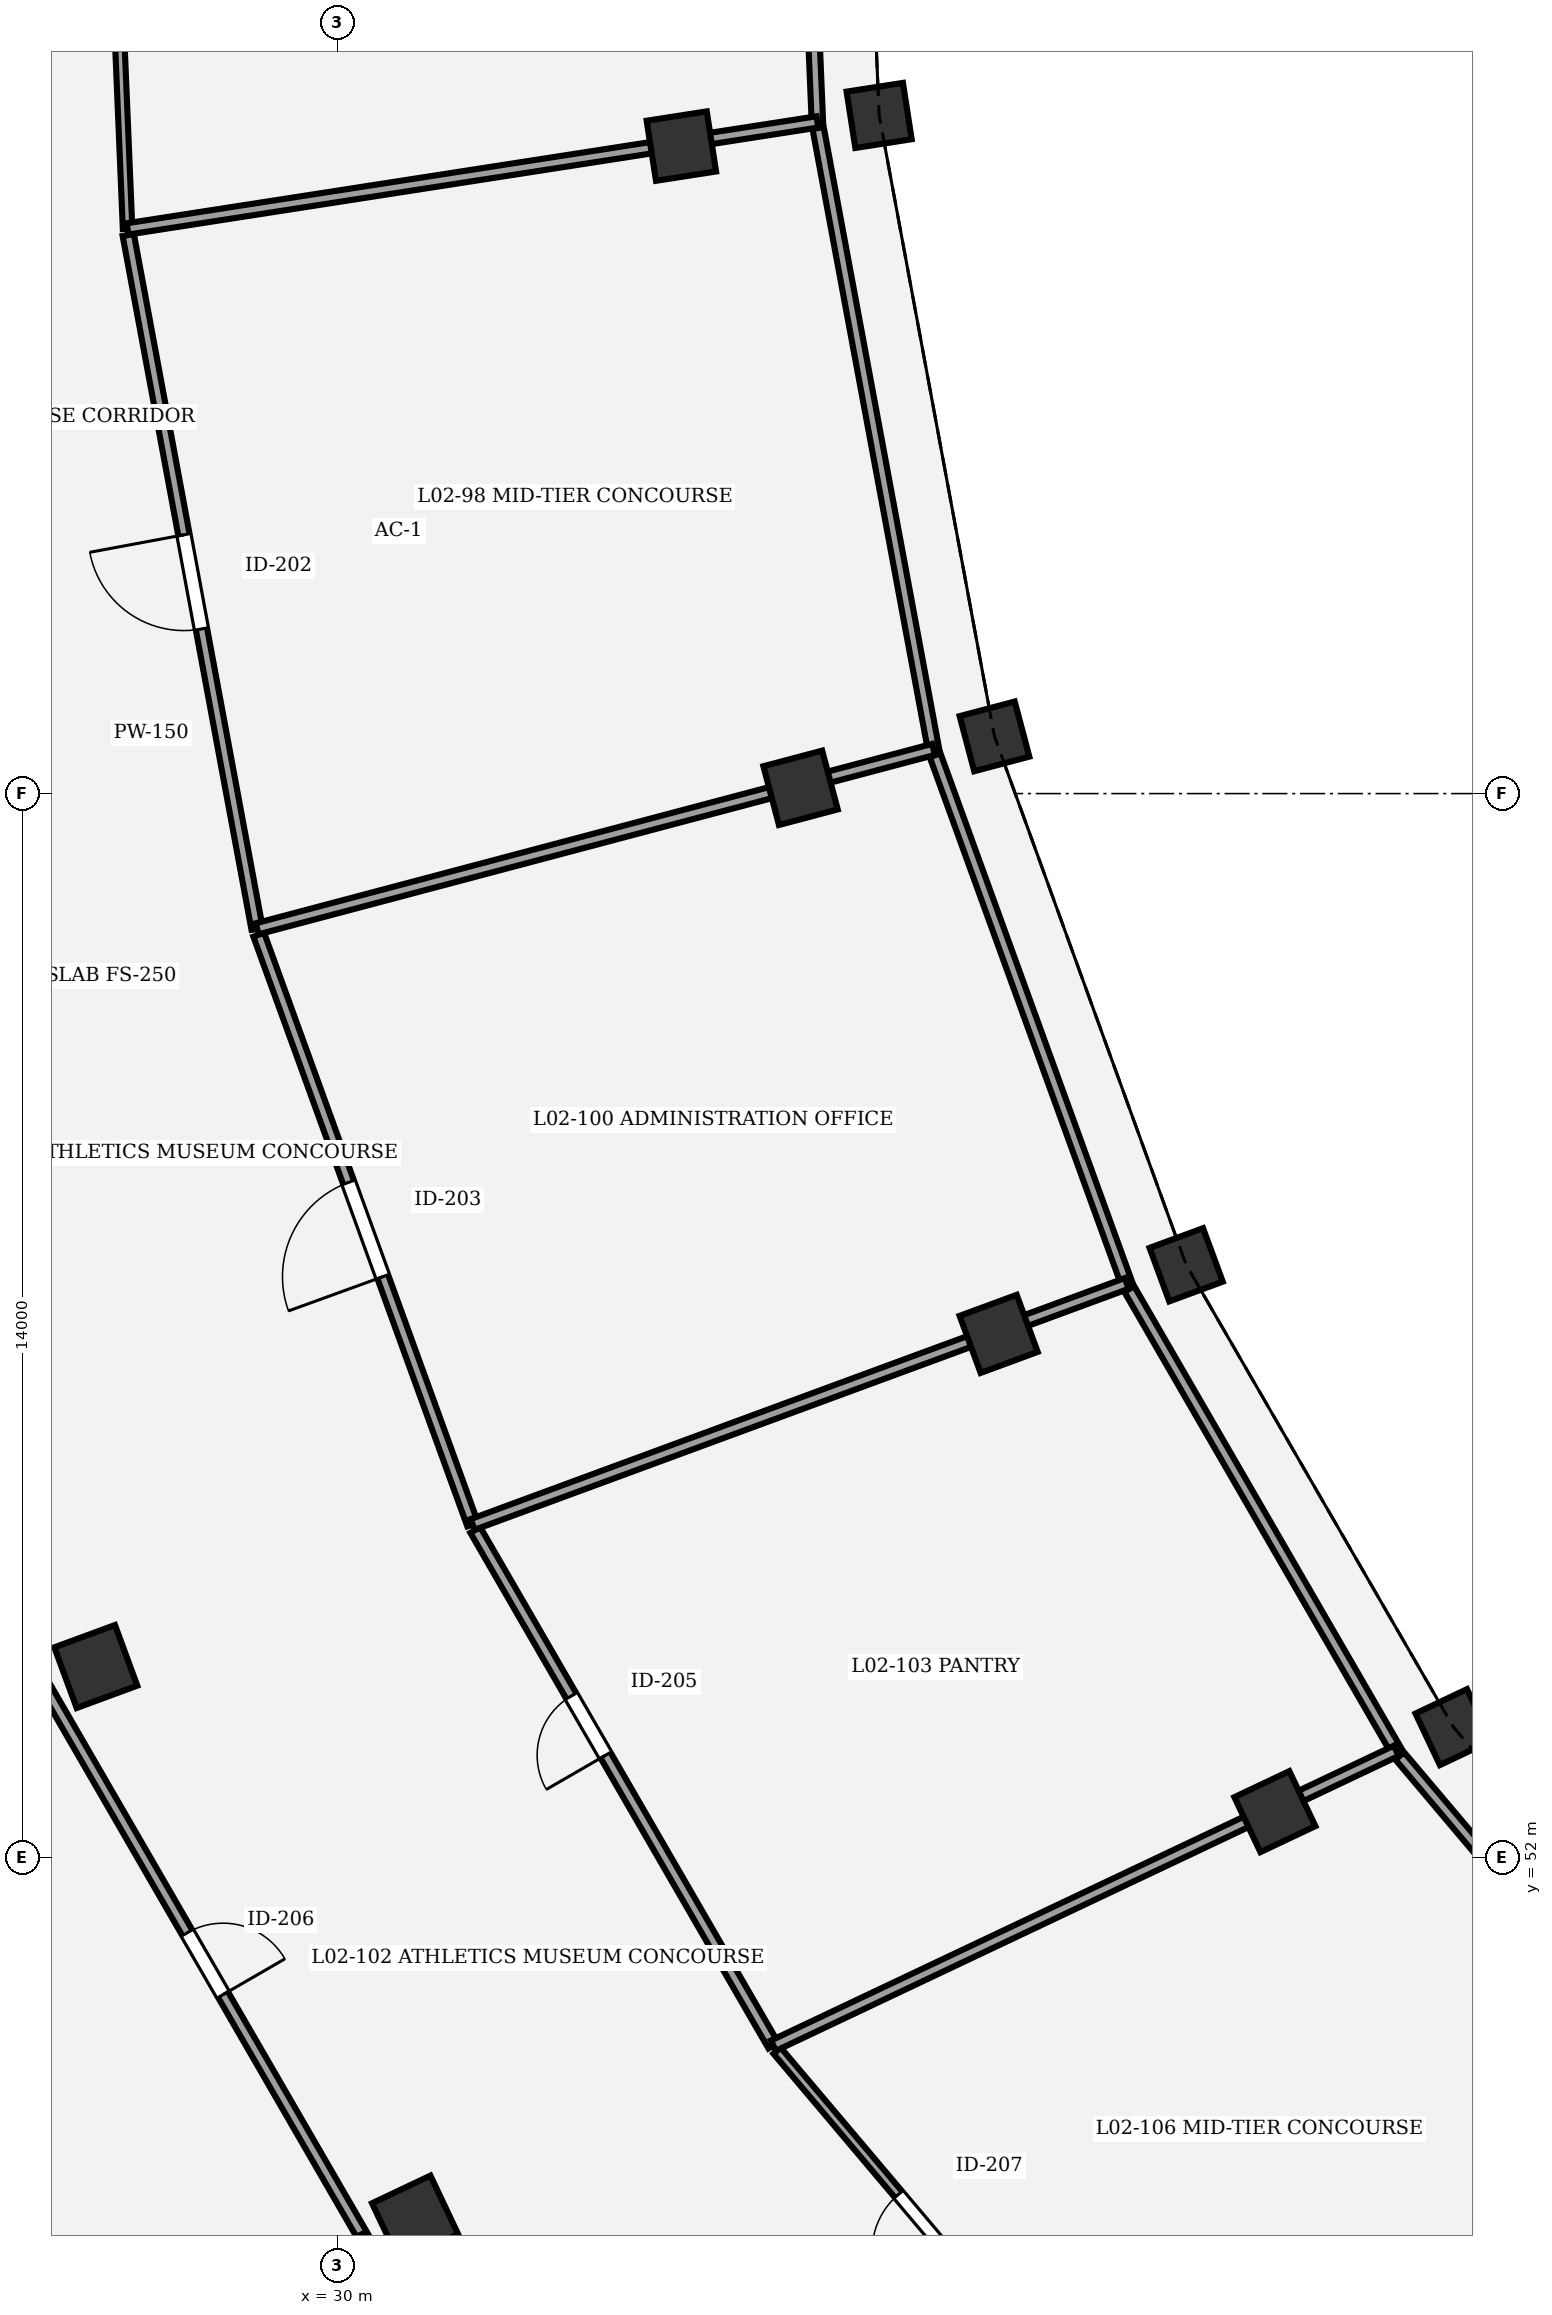
"""IFC4 building model, lengths in metres.
Left out: names, types, materials, properties, quantities, classifications, styles, units other than length and angle.
Written with IfcOpenShell. Run it as: python <this file> out.ifc"""

import sys

from ifc_helpers import new_model, si_unit, direction, frame, frame_2d, origin, origin_2d, place, context, subcontext, project, spatial, rectangle, extrude, element, fill, save


model = new_model("IFC4")
c1 = context("Model", 3, precision=1e-05, world=origin(), true_north=direction((0.0, 1.0)))
c2 = subcontext(c1, "Body", "Model", "MODEL_VIEW")
j1 = project(units=[si_unit("LENGTHUNIT", "METRE"), si_unit("PLANEANGLEUNIT", "RADIAN")], contexts=[c1])
p1 = place(None, origin())
s1 = spatial("IfcSite", under=j1, at=p1, CompositionType="ELEMENT")
p2 = place(p1, origin())
s2 = spatial("IfcBuilding", under=s1, at=p2, CompositionType="ELEMENT")
p3 = place(p2, frame((0.0, 0.0, 10.2)))
s3 = spatial("IfcBuildingStorey", under=s2, at=p3, CompositionType="ELEMENT", Elevation=10.2)
p4 = place(p3, frame((37.131, 74.922, 0.0), z_axis=(0.0, 0.0, 1.0), x_axis=(-0.98817491911, -0.153330783737, 0.0)))
e1 = element("IfcColumn", 1, at=p4, inside=s3, PredefinedType="COLUMN", context=c2, shape_type="SweptSolid", body=[
    extrude(rectangle(XDim=0.75, YDim=0.75, at=origin_2d()), origin(), (0.0, 0.0, 1.0), 4.5),
])
p5 = place(p3, frame((34.529, 74.518, 0.0), z_axis=(0.0, 0.0, 1.0), x_axis=(-0.98817491911, -0.153330783737, 0.0)))
e2 = element("IfcColumn", 2, at=p5, inside=s3, PredefinedType="COLUMN", context=c2, shape_type="SweptSolid", body=[
    extrude(rectangle(XDim=0.8, YDim=0.8, at=origin_2d()), origin(), (0.0, 0.0, 1.0), 4.5),
])
p6 = place(p3, frame((38.648, 66.752, 0.0), z_axis=(0.0, 0.0, 1.0), x_axis=(-0.966600102017, -0.256289373133, 0.0)))
e3 = element("IfcColumn", 3, at=p6, inside=s3, PredefinedType="COLUMN", context=c2, shape_type="SweptSolid", body=[
    extrude(rectangle(XDim=0.75, YDim=0.75, at=origin_2d()), origin(), (0.0, 0.0, 1.0), 4.5),
])
p7 = place(p3, frame((36.097, 66.076, 0.0), z_axis=(0.0, 0.0, 1.0), x_axis=(-0.966600102017, -0.256289373133, 0.0)))
e4 = element("IfcColumn", 4, at=p7, inside=s3, PredefinedType="COLUMN", context=c2, shape_type="SweptSolid", body=[
    extrude(rectangle(XDim=0.8, YDim=0.8, at=origin_2d()), origin(), (0.0, 0.0, 1.0), 4.5),
])
p8 = place(p3, frame((41.17, 59.801, 0.0), z_axis=(0.0, 0.0, 1.0), x_axis=(-0.938372433776, -0.34562577382, 0.0)))
e5 = element("IfcColumn", 5, at=p8, inside=s3, PredefinedType="COLUMN", context=c2, shape_type="SweptSolid", body=[
    extrude(rectangle(XDim=0.75, YDim=0.75, at=origin_2d()), origin(), (0.0, 0.0, 1.0), 4.5),
])
p9 = place(p3, frame((38.703, 58.892, 0.0), z_axis=(0.0, 0.0, 1.0), x_axis=(-0.938372433776, -0.34562577382, 0.0)))
e6 = element("IfcColumn", 6, at=p9, inside=s3, PredefinedType="COLUMN", context=c2, shape_type="SweptSolid", body=[
    extrude(rectangle(XDim=0.8, YDim=0.8, at=origin_2d()), origin(), (0.0, 0.0, 1.0), 4.5),
])
p10 = place(p3, frame((26.824, 54.516, 0.0), z_axis=(0.0, 0.0, 1.0), x_axis=(-0.938372433776, -0.34562577382, 0.0)))
e7 = element("IfcColumn", 7, at=p10, inside=s3, PredefinedType="COLUMN", context=c2, shape_type="SweptSolid", body=[
    extrude(rectangle(XDim=0.85, YDim=0.85, at=origin_2d()), origin(), (0.0, 0.0, 1.0), 4.5),
])
p11 = place(p3, frame((44.687, 53.719, 0.0), z_axis=(0.0, 0.0, 1.0), x_axis=(-0.903858661687, -0.4278311813, 0.0)))
e8 = element("IfcColumn", 8, at=p11, inside=s3, PredefinedType="COLUMN", context=c2, shape_type="SweptSolid", body=[
    extrude(rectangle(XDim=0.75, YDim=0.75, at=origin_2d()), origin(), (0.0, 0.0, 1.0), 4.5),
])
p12 = place(p3, frame((42.337, 52.606, 0.0), z_axis=(0.0, 0.0, 1.0), x_axis=(-0.903858661687, -0.4278311813, 0.0)))
e9 = element("IfcColumn", 9, at=p12, inside=s3, PredefinedType="COLUMN", context=c2, shape_type="SweptSolid", body=[
    extrude(rectangle(XDim=0.8, YDim=0.8, at=origin_2d()), origin(), (0.0, 0.0, 1.0), 4.5),
])
p13 = place(p3, frame((31.024, 47.252, 0.0), z_axis=(0.0, 0.0, 1.0), x_axis=(-0.903858661687, -0.4278311813, 0.0)))
e10 = element("IfcColumn", 10, at=p13, inside=s3, PredefinedType="COLUMN", context=c2, shape_type="SweptSolid", body=[
    extrude(rectangle(XDim=0.85, YDim=0.85, at=origin_2d()), origin(), (0.0, 0.0, 1.0), 4.5),
])
p14 = place(p3, frame((27.242, 73.429, 0.0), z_axis=(0.0, 0.0, 1.0), x_axis=(-0.041894479342, 0.999122040894, 0.0)))
e11 = element("IfcWall", 11, at=p14, inside=s3, PredefinedType="PARTITIONING", context=c2, shape_type="SweptSolid", body=[
    extrude(rectangle(XDim=13.543, YDim=0.125, at=frame_2d((6.771, 0.0))), origin(), (0.0, 0.0, 1.0), 3.25),
])
p15 = place(p14, frame((6.162, 0.0, 0.0)))
e12 = element("IfcOpeningElement", 12, at=p15, cuts=e11, PredefinedType="OPENING", context=c2, shape_type="SweptSolid", body=[
    extrude(rectangle(XDim=1.22, YDim=2.2, at=frame_2d((0.61, 1.1))), frame((0.0, 0.073, 0.0), z_axis=(0.0, -1.0, 0.0), x_axis=(1.0, 0.0, 0.0)), (0.0, 0.0, 1.0), 0.145),
])
p16 = place(p3, frame((28.947, 64.221, 0.0), z_axis=(0.0, 0.0, 1.0), x_axis=(-0.182600545941, 0.983187184936, 0.0)))
e13 = element("IfcWall", 13, at=p16, inside=s3, PredefinedType="PARTITIONING", context=c2, shape_type="SweptSolid", body=[
    extrude(rectangle(XDim=9.284, YDim=0.15, at=frame_2d((4.642, 0.0))), origin(), (0.0, 0.0, 1.0), 3.25),
])
p17 = place(p16, frame((4.012, 0.0, 0.0)))
e14 = element("IfcOpeningElement", 14, at=p17, cuts=e13, PredefinedType="OPENING", context=c2, shape_type="SweptSolid", body=[
    extrude(rectangle(XDim=1.26, YDim=2.2, at=frame_2d((0.63, 1.1))), frame((0.0, 0.085, 0.0), z_axis=(0.0, -1.0, 0.0), x_axis=(1.0, 0.0, 0.0)), (0.0, 0.0, 1.0), 0.17),
])
p18 = place(p3, frame((31.782, 56.385, 0.0), z_axis=(0.0, 0.0, 1.0), x_axis=(-0.341044733968, 0.940047067669, 0.0)))
e15 = element("IfcWall", 15, at=p18, inside=s3, PredefinedType="PARTITIONING", context=c2, shape_type="SweptSolid", body=[
    extrude(rectangle(XDim=8.254, YDim=0.15, at=frame_2d((4.127, 0.0))), origin(), (0.0, 0.0, 1.0), 3.25),
])
p19 = place(p18, frame((3.467, 0.0, 0.0)))
e16 = element("IfcOpeningElement", 16, at=p19, cuts=e15, PredefinedType="OPENING", context=c2, shape_type="SweptSolid", body=[
    extrude(rectangle(XDim=1.32, YDim=2.2, at=frame_2d((0.66, 1.1))), frame((0.0, 0.085, 0.0), z_axis=(0.0, -1.0, 0.0), x_axis=(1.0, 0.0, 0.0)), (0.0, 0.0, 1.0), 0.17),
])
p20 = place(p3, frame((35.74, 49.528, 0.0), z_axis=(0.0, 0.0, 1.0), x_axis=(-0.500584301803, 0.865687794063, 0.0)))
e17 = element("IfcWall", 17, at=p20, inside=s3, PredefinedType="PARTITIONING", context=c2, shape_type="SweptSolid", body=[
    extrude(rectangle(XDim=7.837, YDim=0.15, at=frame_2d((3.918, 0.0))), origin(), (0.0, 0.0, 1.0), 3.25),
])
p21 = place(p20, frame((4.413, 0.0, 0.0)))
e18 = element("IfcOpeningElement", 18, at=p21, cuts=e17, PredefinedType="OPENING", context=c2, shape_type="SweptSolid", body=[
    extrude(rectangle(XDim=0.9, YDim=2.3, at=frame_2d((0.45, 1.15))), frame((0.0, 0.085, 0.0), z_axis=(0.0, -1.0, 0.0), x_axis=(1.0, 0.0, 0.0)), (0.0, 0.0, 1.0), 0.17),
])
p22 = place(p3, frame((26.167, 54.231, 0.0), z_axis=(0.0, 0.0, 1.0), x_axis=(0.500559280672, -0.865702262059, 0.0)))
e19 = element("IfcWall", 19, at=p22, inside=s3, PredefinedType="PARTITIONING", context=c2, shape_type="SweptSolid", body=[
    extrude(rectangle(XDim=8.375, YDim=0.15, at=frame_2d((4.187, 0.0))), origin(), (0.0, 0.0, 1.0), 3.25),
])
p23 = place(p22, frame((3.717, 0.0, 0.0)))
e20 = element("IfcOpeningElement", 20, at=p23, cuts=e19, PredefinedType="OPENING", context=c2, shape_type="SweptSolid", body=[
    extrude(rectangle(XDim=0.94, YDim=2.3, at=frame_2d((0.47, 1.15))), frame((0.0, 0.085, 0.0), z_axis=(0.0, -1.0, 0.0), x_axis=(1.0, 0.0, 0.0)), (0.0, 0.0, 1.0), 0.17),
])
p24 = place(p3, frame((40.807, 43.518, 0.0), z_axis=(0.0, 0.0, 1.0), x_axis=(-0.645180817826, 0.764029915847, 0.0)))
e21 = element("IfcWall", 21, at=p24, inside=s3, PredefinedType="PARTITIONING", context=c2, shape_type="SweptSolid", body=[
    extrude(rectangle(XDim=7.779, YDim=0.125, at=frame_2d((3.89, 0.0))), origin(), (0.0, 0.0, 1.0), 3.25),
])
p25 = place(p24, frame((4.323, 0.0, 0.0)))
e22 = element("IfcOpeningElement", 22, at=p25, cuts=e21, PredefinedType="OPENING", context=c2, shape_type="SweptSolid", body=[
    extrude(rectangle(XDim=0.98, YDim=2.3, at=frame_2d((0.49, 1.15))), frame((0.0, 0.073, 0.0), z_axis=(0.0, -1.0, 0.0), x_axis=(1.0, 0.0, 0.0)), (0.0, 0.0, 1.0), 0.145),
])
p26 = place(p3, frame((35.81, 86.96, 0.0), z_axis=(0.0, 0.0, 1.0), x_axis=(0.041909219346, -0.999121422718, 0.0)))
e23 = element("IfcWall", 23, at=p26, inside=s3, PredefinedType="PARTITIONING", context=c2, shape_type="SweptSolid", body=[
    extrude(rectangle(XDim=12.135, YDim=0.15, at=frame_2d((6.067, 0.0))), origin(), (0.0, 0.0, 1.0), 3.25),
])
p27 = place(p3, frame((36.318, 74.836, 0.0), z_axis=(0.0, 0.0, 1.0), x_axis=(-0.988188135357, -0.153245584407, 0.0)))
e24 = element("IfcWall", 24, at=p27, inside=s3, PredefinedType="PARTITIONING", context=c2, shape_type="SweptSolid", body=[
    extrude(rectangle(XDim=9.184, YDim=0.15, at=frame_2d((4.592, 0.0))), origin(), (0.0, 0.0, 1.0), 3.25),
])
p28 = place(p3, frame((36.327, 74.757, 0.0), z_axis=(0.0, 0.0, 1.0), x_axis=(0.182614898171, -0.983184519287, 0.0)))
e25 = element("IfcWall", 25, at=p28, inside=s3, PredefinedType="PARTITIONING", context=c2, shape_type="SweptSolid", body=[
    extrude(rectangle(XDim=8.316, YDim=0.15, at=frame_2d((4.158, 0.0))), origin(), (0.0, 0.0, 1.0), 3.25),
])
p29 = place(p3, frame((37.846, 66.581, 0.0), z_axis=(0.0, 0.0, 1.0), x_axis=(-0.96658744027, -0.256337122383, 0.0)))
e26 = element("IfcWall", 26, at=p29, inside=s3, PredefinedType="PARTITIONING", context=c2, shape_type="SweptSolid", body=[
    extrude(rectangle(XDim=9.207, YDim=0.15, at=frame_2d((4.604, 0.0))), origin(), (0.0, 0.0, 1.0), 3.25),
])
p30 = place(p3, frame((37.867, 66.504, 0.0), z_axis=(0.0, 0.0, 1.0), x_axis=(0.34104817416, -0.940045819576, 0.0)))
e27 = element("IfcWall", 27, at=p30, inside=s3, PredefinedType="PARTITIONING", context=c2, shape_type="SweptSolid", body=[
    extrude(rectangle(XDim=7.392, YDim=0.15, at=frame_2d((3.696, 0.0))), origin(), (0.0, 0.0, 1.0), 3.25),
])
p31 = place(p3, frame((40.388, 59.555, 0.0), z_axis=(0.0, 0.0, 1.0), x_axis=(-0.93834402583, -0.345702891496, 0.0)))
e28 = element("IfcWall", 28, at=p31, inside=s3, PredefinedType="PARTITIONING", context=c2, shape_type="SweptSolid", body=[
    extrude(rectangle(XDim=9.171, YDim=0.15, at=frame_2d((4.585, 0.0))), origin(), (0.0, 0.0, 1.0), 3.25),
])
p32 = place(p3, frame((40.421, 59.482, 0.0), z_axis=(0.0, 0.0, 1.0), x_axis=(0.500549390525, -0.865707980583, 0.0)))
e29 = element("IfcWall", 29, at=p32, inside=s3, PredefinedType="PARTITIONING", context=c2, shape_type="SweptSolid", body=[
    extrude(rectangle(XDim=7.018, YDim=0.15, at=frame_2d((3.509, 0.0))), origin(), (0.0, 0.0, 1.0), 3.25),
])
p33 = place(p3, frame((43.934, 53.406, 0.0), z_axis=(0.0, 0.0, 1.0), x_axis=(-0.903860081227, -0.427828182292, 0.0)))
e30 = element("IfcWall", 30, at=p33, inside=s3, PredefinedType="PARTITIONING", context=c2, shape_type="SweptSolid", body=[
    extrude(rectangle(XDim=9.066, YDim=0.15, at=frame_2d((4.533, 0.0))), origin(), (0.0, 0.0, 1.0), 3.25),
])
p34 = place(p3, frame((30.359, 46.981, 0.0), z_axis=(0.0, 0.0, 1.0), x_axis=(-0.903854859666, -0.427839213559, 0.0)))
e31 = element("IfcWall", 31, at=p34, inside=s3, PredefinedType="PARTITIONING", context=c2, shape_type="SweptSolid", body=[
    extrude(rectangle(XDim=7.814, YDim=0.15, at=frame_2d((3.907, 0.0))), origin(), (0.0, 0.0, 1.0), 3.25),
])
p35 = place(p3, frame((43.98, 53.34, 0.0), z_axis=(0.0, 0.0, 1.0), x_axis=(0.64516899819, -0.764039896716, 0.0)))
e32 = element("IfcWall", 32, at=p35, inside=s3, PredefinedType="PARTITIONING", context=c2, shape_type="SweptSolid", body=[
    extrude(rectangle(XDim=6.967, YDim=0.15, at=frame_2d((3.483, 0.0))), origin(), (0.0, 0.0, 1.0), 3.25),
])
p36 = place(p3, frame((48.475, 48.017, 0.0), z_axis=(0.0, 0.0, 1.0), x_axis=(-0.862518193496, -0.506026052579, 0.0)))
e33 = element("IfcWall", 33, at=p36, inside=s3, PredefinedType="PARTITIONING", context=c2, shape_type="SweptSolid", body=[
    extrude(rectangle(XDim=8.89, YDim=0.15, at=frame_2d((4.445, 0.0))), origin(), (0.0, 0.0, 1.0), 3.25),
])
p37 = place(p17, origin())
e34 = element("IfcDoor", 34, at=p37, inside=s3, OperationType="SINGLE_SWING_RIGHT", PredefinedType="DOOR", context=c2, shape_type="SweptSolid", body=[
    extrude(rectangle(XDim=1.26, YDim=2.2, at=frame_2d((0.63, 1.1))), frame((0.0, 0.025, 0.0), z_axis=(0.0, -1.0, 0.0), x_axis=(1.0, 0.0, 0.0)), (0.0, 0.0, 1.0), 0.05),
])
fill(e14, e34)
p38 = place(p19, origin())
e35 = element("IfcDoor", 35, at=p38, inside=s3, OperationType="SINGLE_SWING_LEFT", PredefinedType="DOOR", context=c2, shape_type="SweptSolid", body=[
    extrude(rectangle(XDim=1.32, YDim=2.2, at=frame_2d((0.66, 1.1))), frame((0.0, 0.025, 0.0), z_axis=(0.0, -1.0, 0.0), x_axis=(1.0, 0.0, 0.0)), (0.0, 0.0, 1.0), 0.05),
])
fill(e16, e35)
p39 = place(p21, origin())
e36 = element("IfcDoor", 36, at=p39, inside=s3, OperationType="SINGLE_SWING_LEFT", PredefinedType="DOOR", context=c2, shape_type="SweptSolid", body=[
    extrude(rectangle(XDim=0.9, YDim=2.3, at=frame_2d((0.45, 1.15))), frame((0.0, 0.025, 0.0), z_axis=(0.0, -1.0, 0.0), x_axis=(1.0, 0.0, 0.0)), (0.0, 0.0, 1.0), 0.05),
])
fill(e18, e36)
p40 = place(p23, origin())
e37 = element("IfcDoor", 37, at=p40, inside=s3, OperationType="SINGLE_SWING_RIGHT", PredefinedType="DOOR", context=c2, shape_type="SweptSolid", body=[
    extrude(rectangle(XDim=0.94, YDim=2.3, at=frame_2d((0.47, 1.15))), frame((0.0, 0.025, 0.0), z_axis=(0.0, -1.0, 0.0), x_axis=(1.0, 0.0, 0.0)), (0.0, 0.0, 1.0), 0.05),
])
fill(e20, e37)
p41 = place(p25, origin())
e38 = element("IfcDoor", 38, at=p41, inside=s3, OperationType="SINGLE_SWING_LEFT", PredefinedType="DOOR", context=c2, shape_type="SweptSolid", body=[
    extrude(rectangle(XDim=0.98, YDim=2.3, at=frame_2d((0.49, 1.15))), frame((0.0, 0.025, 0.0), z_axis=(0.0, -1.0, 0.0), x_axis=(1.0, 0.0, 0.0)), (0.0, 0.0, 1.0), 0.05),
])
fill(e22, e38)
save(model, sys.argv[1])
